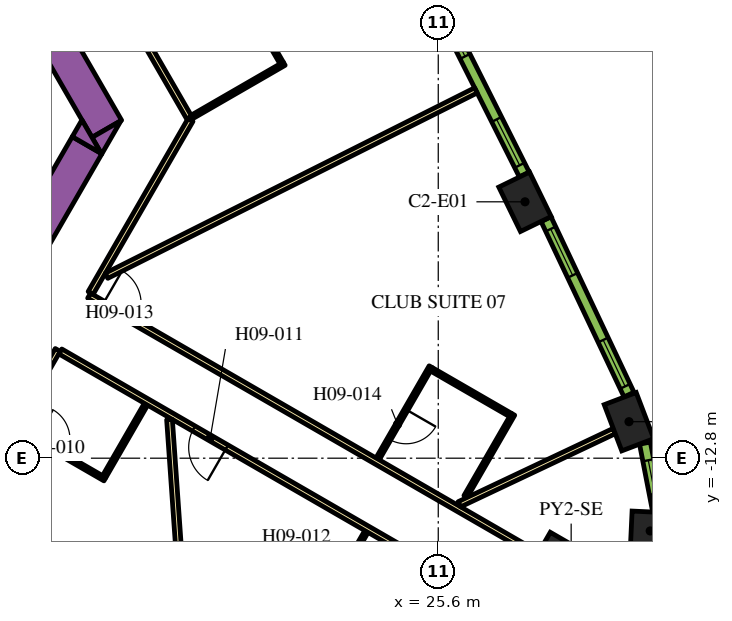
"""IFC4 building model, lengths in metres.
Left out: names, types, materials, properties, quantities, classifications, styles, units other than length and angle.
Written with IfcOpenShell. Run it as: python <this file> out.ifc"""

import sys

from ifc_helpers import new_model, si_unit, direction, frame, frame_2d, origin, origin_2d, place, context, subcontext, project, spatial, polyline, rectangle, outline, extrude, element, fill, save


model = new_model("IFC4")
c1 = context("Model", 3, precision=1e-05, world=origin(), true_north=direction((0.0, 1.0)))
c2 = subcontext(c1, "Body", "Model", "MODEL_VIEW")
j1 = project(units=[si_unit("LENGTHUNIT", "METRE"), si_unit("PLANEANGLEUNIT", "RADIAN")], contexts=[c1])
p1 = place(None, origin())
s1 = spatial("IfcSite", under=j1, at=p1, CompositionType="ELEMENT")
p2 = place(p1, origin())
s2 = spatial("IfcBuilding", under=s1, at=p2, CompositionType="ELEMENT")
p3 = place(p2, frame((0.0, 0.0, 118.8)))
s3 = spatial("IfcBuildingStorey", under=s2, at=p3, CompositionType="ELEMENT", Elevation=118.8)
p4 = place(p3, frame((29.097, -16.799, 0.0), z_axis=(0.0, 0.0, 1.0), x_axis=(0.866025403784, -0.5, 0.0)))
e1 = element("IfcColumn", 1, at=p4, inside=s3, PredefinedType="COLUMN", context=c2, shape_type="SweptSolid", body=[
    extrude(rectangle(XDim=3.0, YDim=3.0, at=origin_2d()), origin(), (0.0, 0.0, 1.0), 3.9),
])
p5 = place(p3, frame((31.177, -14.714, 0.0), z_axis=(0.0, 0.0, 1.0), x_axis=(0.046756026083, 0.998906338965, 0.0)))
e2 = element("IfcColumn", 2, at=p5, inside=s3, PredefinedType="COLUMN", context=c2, shape_type="SweptSolid", body=[
    extrude(rectangle(XDim=1.0, YDim=1.0, at=origin_2d()), origin(), (0.0, 0.0, 1.0), 3.9),
])
for number, where, z_axis, x_axis in (
    (3, (30.619, -11.839, 0.0), (0.0, 0.0, 1.0), (-0.355, 0.935, 0.0)),
    (4, (27.883, -6.054, 0.0), (0.0, 0.0, 1.0), (-0.438, 0.899, 0.0)),
):
    element("IfcColumn", number, at=place(p3, frame(where, z_axis=z_axis, x_axis=x_axis)), inside=s3, PredefinedType="COLUMN", context=c2, shape_type="SweptSolid", body=[
        extrude(rectangle(XDim=1.3, YDim=0.9, at=origin_2d()), origin(), (0.0, 0.0, 1.0), 3.9),
    ])
p6 = place(p3, frame((6.776, 13.364, 0.0), z_axis=(0.0, 0.0, 1.0), x_axis=(0.500004177138, -0.8660229921, 0.0)))
e5 = element("IfcWall", 5, at=p6, inside=s3, PredefinedType="SOLIDWALL", context=c2, shape_type="SweptSolid", body=[
    extrude(rectangle(XDim=20.204, YDim=0.9, at=frame_2d((10.102, 0.0))), origin(), (0.0, 0.0, 1.0), 3.9),
])
p7 = place(p3, origin())
e6 = element("IfcWall", 6, at=p7, inside=s3, PredefinedType="SOLIDWALL", context=c2, shape_type="SweptSolid", body=[
    extrude(outline(polyline([(16.743, -4.8), (16.489, -4.36), (17.251, -3.92), (16.743, -4.8)])), origin(), (0.0, 0.0, 1.0), 3.9),
])
p8 = place(p3, frame((11.943, -12.214, 0.0), z_axis=(0.0, 0.0, 1.0), x_axis=(0.49998092645, 0.866036415623, 0.0)))
e7 = element("IfcWall", 7, at=p8, inside=s3, PredefinedType="SOLIDWALL", context=c2, shape_type="SweptSolid", body=[
    extrude(rectangle(XDim=8.83, YDim=0.9, at=frame_2d((4.415, 0.0))), origin(), (0.0, 0.0, 1.0), 3.9),
])
e8 = element("IfcWall", 8, at=p7, inside=s3, PredefinedType="SOLIDWALL", context=c2, shape_type="SweptSolid", body=[
    extrude(outline(polyline([(16.223, -3.9), (16.732, -4.78), (15.969, -4.34), (16.223, -3.9)])), origin(), (0.0, 0.0, 1.0), 3.9),
])
p9 = place(p3, frame((16.412, -8.523, 0.0), z_axis=(0.0, 0.0, 1.0), x_axis=(0.866025629663, -0.499999608766, 0.0)))
e9 = element("IfcWall", 9, at=p9, inside=s3, PredefinedType="PARTITIONING", context=c2, shape_type="SweptSolid", body=[
    extrude(rectangle(XDim=13.624, YDim=0.15, at=frame_2d((6.812, 0.0))), origin(), (0.0, 0.0, 1.0), 2.75),
])
p10 = place(p9, frame((0.426, 0.0, 0.0)))
e10 = element("IfcOpeningElement", 10, at=p10, cuts=e9, PredefinedType="OPENING", context=c2, shape_type="SweptSolid", body=[
    extrude(rectangle(XDim=1.0, YDim=2.1, at=frame_2d((0.5, 1.05))), frame((0.0, 0.085, 0.0), z_axis=(0.0, -1.0, 0.0), x_axis=(1.0, 0.0, 0.0)), (0.0, 0.0, 1.0), 0.17),
])
p11 = place(p3, frame((19.081, -3.9, 0.0), z_axis=(0.0, 0.0, 1.0), x_axis=(-0.499974327079, -0.866040225545, 0.0)))
e11 = element("IfcWall", 11, at=p11, inside=s3, PredefinedType="PARTITIONING", context=c2, shape_type="SweptSolid", body=[
    extrude(rectangle(XDim=5.258, YDim=0.15, at=frame_2d((2.629, 0.0))), origin(), (0.0, 0.0, 1.0), 2.75),
])
p12 = place(p3, frame((6.163, 18.475, 0.0), z_axis=(0.0, 0.0, 1.0), x_axis=(0.500001317485, -0.866024643133, 0.0)))
e12 = element("IfcWall", 12, at=p12, inside=s3, PredefinedType="PARTITIONING", context=c2, shape_type="SweptSolid", body=[
    extrude(rectangle(XDim=25.767, YDim=0.15, at=frame_2d((12.883, 0.0))), origin(), (0.0, 0.0, 1.0), 2.75),
])
p13 = place(p12, frame((19.306, 0.0, 0.0)))
e13 = element("IfcOpeningElement", 13, at=p13, cuts=e12, PredefinedType="OPENING", context=c2, shape_type="SweptSolid", body=[
    extrude(rectangle(XDim=1.0, YDim=2.1, at=frame_2d((0.5, 1.05))), frame((0.0, 0.085, 0.0), z_axis=(0.0, -1.0, 0.0), x_axis=(1.0, 0.0, 0.0)), (0.0, 0.0, 1.0), 0.17),
])
p14 = place(p12, frame((17.999, 0.0, 0.0)))
e14 = element("IfcOpeningElement", 14, at=p14, cuts=e12, PredefinedType="OPENING", context=c2, shape_type="SweptSolid", body=[
    extrude(rectangle(XDim=1.0, YDim=2.1, at=frame_2d((0.5, 1.05))), frame((0.0, 0.085, 0.0), z_axis=(0.0, -1.0, 0.0), x_axis=(1.0, 0.0, 0.0)), (0.0, 0.0, 1.0), 0.17),
])
p15 = place(p12, frame((0.596, 0.0, 0.0)))
e15 = element("IfcOpeningElement", 15, at=p15, cuts=e12, PredefinedType="OPENING", context=c2, shape_type="SweptSolid", body=[
    extrude(rectangle(XDim=1.0, YDim=2.1, at=frame_2d((0.5, 1.05))), frame((0.0, 0.085, 0.0), z_axis=(0.0, -1.0, 0.0), x_axis=(1.0, 0.0, 0.0)), (0.0, 0.0, 1.0), 0.17),
])
p16 = place(p3, frame((15.587, -9.952, 0.0), z_axis=(0.0, 0.0, 1.0), x_axis=(-0.500016618951, -0.866015808616, 0.0)))
e16 = element("IfcWall", 16, at=p16, inside=s3, PredefinedType="PARTITIONING", context=c2, shape_type="SweptSolid", body=[
    extrude(rectangle(XDim=5.268, YDim=0.15, at=frame_2d((2.634, 0.0))), origin(), (0.0, 0.0, 1.0), 2.75),
])
p17 = place(p16, frame((4.088, 0.0, 0.0)))
e17 = element("IfcOpeningElement", 17, at=p17, cuts=e16, PredefinedType="OPENING", context=c2, shape_type="SweptSolid", body=[
    extrude(rectangle(XDim=1.0, YDim=2.1, at=frame_2d((0.5, 1.05))), frame((0.0, 0.085, 0.0), z_axis=(0.0, -1.0, 0.0), x_axis=(1.0, 0.0, 0.0)), (0.0, 0.0, 1.0), 0.17),
])
p18 = place(p3, frame((27.386, -16.764, 0.0), z_axis=(0.0, 0.0, 1.0), x_axis=(-0.866022585856, 0.500004880763, 0.0)))
e18 = element("IfcWall", 18, at=p18, inside=s3, PredefinedType="PARTITIONING", context=c2, shape_type="SweptSolid", body=[
    extrude(rectangle(XDim=13.544, YDim=0.15, at=frame_2d((6.772, 0.0))), origin(), (0.0, 0.0, 1.0), 2.75),
])
p19 = place(p18, frame((8.491, 0.0, 0.0)))
e19 = element("IfcOpeningElement", 19, at=p19, cuts=e18, PredefinedType="OPENING", context=c2, shape_type="SweptSolid", body=[
    extrude(rectangle(XDim=1.0, YDim=2.1, at=frame_2d((0.5, 1.05))), frame((0.0, 0.085, 0.0), z_axis=(0.0, -1.0, 0.0), x_axis=(1.0, 0.0, 0.0)), (0.0, 0.0, 1.0), 0.17),
])
p20 = place(p3, frame((26.591, -3.122, 0.0), z_axis=(0.0, 0.0, 1.0), x_axis=(-0.893766213273, -0.448533115847, 0.0)))
e20 = element("IfcWall", 20, at=p20, inside=s3, PredefinedType="PARTITIONING", context=c2, shape_type="SweptSolid", body=[
    extrude(rectangle(XDim=10.875, YDim=0.15, at=frame_2d((5.438, 0.0))), origin(), (0.0, 0.0, 1.0), 2.75),
])
p21 = place(p3, frame((19.153, -20.671, 0.0), z_axis=(0.0, 0.0, 1.0), x_axis=(-0.070070736723, 0.997542025107, 0.0)))
e21 = element("IfcWall", 21, at=p21, inside=s3, PredefinedType="PARTITIONING", context=c2, shape_type="SweptSolid", body=[
    extrude(rectangle(XDim=8.909, YDim=0.15, at=frame_2d((4.455, 0.0))), origin(), (0.0, 0.0, 1.0), 2.75),
])
p22 = place(p3, frame((30.231, -12.085, 0.0), z_axis=(0.0, 0.0, 1.0), x_axis=(-0.904001132572, -0.427530060122, 0.0)))
e22 = element("IfcWall", 22, at=p22, inside=s3, PredefinedType="PARTITIONING", context=c2, shape_type="SweptSolid", body=[
    extrude(rectangle(XDim=4.51, YDim=0.15, at=frame_2d((2.255, 0.0))), origin(), (0.0, 0.0, 1.0), 2.75),
])
p23 = place(p3, frame((14.49, -12.003, 0.0), z_axis=(0.0, 0.0, 1.0), x_axis=(0.866059108428, -0.4999416173, 0.0)))
e23 = element("IfcWall", 23, at=p23, inside=s3, PredefinedType="PARTITIONING", context=c2, shape_type="SweptSolid", body=[
    extrude(rectangle(XDim=2.7, YDim=0.1, at=frame_2d((1.35, 0.0))), origin(), (0.0, 0.0, 1.0), 2.75),
])
p24 = place(p23, frame((0.6, 0.0, 0.0)))
e24 = element("IfcOpeningElement", 24, at=p24, cuts=e23, PredefinedType="OPENING", context=c2, shape_type="SweptSolid", body=[
    extrude(rectangle(XDim=0.9, YDim=2.1, at=frame_2d((0.45, 1.05))), frame((0.0, 0.06, 0.0), z_axis=(0.0, -1.0, 0.0), x_axis=(1.0, 0.0, 0.0)), (0.0, 0.0, 1.0), 0.12),
])
p25 = place(p3, frame((16.81, -13.285, 0.0), z_axis=(0.0, 0.0, 1.0), x_axis=(0.499994660107, 0.866028486751, 0.0)))
e25 = element("IfcWall", 25, at=p25, inside=s3, PredefinedType="PARTITIONING", context=c2, shape_type="SweptSolid", body=[
    extrude(rectangle(XDim=2.2, YDim=0.1, at=frame_2d((1.1, 0.0))), origin(), (0.0, 0.0, 1.0), 2.75),
])
p26 = place(p3, frame((23.71, -14.728, 0.0), z_axis=(0.0, 0.0, 1.0), x_axis=(-0.500006934395, -0.866021400173, 0.0)))
e26 = element("IfcWall", 26, at=p26, inside=s3, PredefinedType="PARTITIONING", context=c2, shape_type="SweptSolid", body=[
    extrude(rectangle(XDim=2.6, YDim=0.1, at=frame_2d((1.3, 0.0))), origin(), (0.0, 0.0, 1.0), 2.75),
])
p27 = place(p26, frame((0.6, 0.0, 0.0)))
e27 = element("IfcOpeningElement", 27, at=p27, cuts=e26, PredefinedType="OPENING", context=c2, shape_type="SweptSolid", body=[
    extrude(rectangle(XDim=0.9, YDim=2.1, at=frame_2d((0.45, 1.05))), frame((0.0, 0.06, 0.0), z_axis=(0.0, -1.0, 0.0), x_axis=(1.0, 0.0, 0.0)), (0.0, 0.0, 1.0), 0.12),
])
p28 = place(p3, frame((25.404, -10.395, 0.0), z_axis=(0.0, 0.0, 1.0), x_axis=(-0.49998411664, -0.866034573852, 0.0)))
e28 = element("IfcWall", 28, at=p28, inside=s3, PredefinedType="PARTITIONING", context=c2, shape_type="SweptSolid", body=[
    extrude(rectangle(XDim=2.8, YDim=0.1, at=frame_2d((1.4, 0.0))), origin(), (0.0, 0.0, 1.0), 2.75),
])
p29 = place(p28, frame((1.3, 0.0, 0.0)))
e29 = element("IfcOpeningElement", 29, at=p29, cuts=e28, PredefinedType="OPENING", context=c2, shape_type="SweptSolid", body=[
    extrude(rectangle(XDim=0.9, YDim=2.1, at=frame_2d((0.45, 1.05))), frame((0.0, 0.06, 0.0), z_axis=(0.0, -1.0, 0.0), x_axis=(1.0, 0.0, 0.0)), (0.0, 0.0, 1.0), 0.12),
])
p30 = place(p3, frame((25.422, -10.463, 0.0), z_axis=(0.0, 0.0, 1.0), x_axis=(0.866024647952, -0.500001309137, 0.0)))
e30 = element("IfcWall", 30, at=p30, inside=s3, PredefinedType="PARTITIONING", context=c2, shape_type="SweptSolid", body=[
    extrude(rectangle(XDim=2.4, YDim=0.1, at=frame_2d((1.2, 0.0))), origin(), (0.0, 0.0, 1.0), 2.75),
])
p31 = place(p3, frame((26.319, -13.81, 0.0), z_axis=(0.0, 0.0, 1.0), x_axis=(0.500004234368, 0.866022959057, 0.0)))
e31 = element("IfcWall", 31, at=p31, inside=s3, PredefinedType="PARTITIONING", context=c2, shape_type="SweptSolid", body=[
    extrude(rectangle(XDim=2.5, YDim=0.1, at=frame_2d((1.25, 0.0))), origin(), (0.0, 0.0, 1.0), 2.75),
])
p32 = place(p3, frame((20.278, -0.323, 0.0), z_axis=(0.0, 0.0, 1.0), x_axis=(0.500001309137, -0.866024647952, 0.0)))
e32 = element("IfcWall", 32, at=p32, inside=s3, PredefinedType="PARTITIONING", context=c2, shape_type="SweptSolid", body=[
    extrude(rectangle(XDim=2.4, YDim=0.1, at=frame_2d((1.2, 0.0))), origin(), (0.0, 0.0, 1.0), 2.75),
])
p33 = place(p3, frame((19.121, -3.819, 0.0), z_axis=(0.0, 0.0, 1.0), x_axis=(0.866034573852, 0.49998411664, 0.0)))
e33 = element("IfcWall", 33, at=p33, inside=s3, PredefinedType="PARTITIONING", context=c2, shape_type="SweptSolid", body=[
    extrude(rectangle(XDim=2.8, YDim=0.1, at=frame_2d((1.4, 0.0))), origin(), (0.0, 0.0, 1.0), 2.75),
])
p34 = place(p3, frame((31.385, -14.189, 0.0), z_axis=(0.0, 0.0, 1.0), x_axis=(-0.190409913989, 0.981704672829, 0.0)))
e34 = element("IfcWall", 34, at=p34, inside=s3, PredefinedType="SOLIDWALL", context=c2, shape_type="SweptSolid", body=[
    extrude(rectangle(XDim=1.819, YDim=0.29, at=frame_2d((0.91, 0.0))), origin(), (0.0, 0.0, 1.0), 3.65),
])
p35 = place(p34, frame((0.46, 0.0, 0.9)))
e35 = element("IfcOpeningElement", 35, at=p35, cuts=e34, PredefinedType="OPENING", context=c2, shape_type="SweptSolid", body=[
    extrude(rectangle(XDim=0.9, YDim=2.15, at=frame_2d((0.45, 1.075))), frame((0.0, 0.155, 0.0), z_axis=(0.0, -1.0, 0.0), x_axis=(1.0, 0.0, 0.0)), (0.0, 0.0, 1.0), 0.31),
])
p36 = place(p3, frame((30.62, -11.127, 0.0), z_axis=(0.0, 0.0, 1.0), x_axis=(-0.427543726596, 0.903994669148, 0.0)))
e36 = element("IfcWall", 36, at=p36, inside=s3, PredefinedType="SOLIDWALL", context=c2, shape_type="SweptSolid", body=[
    extrude(rectangle(XDim=5.107, YDim=0.29, at=frame_2d((2.553, 0.0))), origin(), (0.0, 0.0, 1.0), 3.65),
])
p37 = place(p36, frame((0.24, 0.0, 0.9)))
e37 = element("IfcOpeningElement", 37, at=p37, cuts=e36, PredefinedType="OPENING", context=c2, shape_type="SweptSolid", body=[
    extrude(rectangle(XDim=1.35, YDim=2.15, at=frame_2d((0.675, 1.075))), frame((0.0, 0.155, 0.0), z_axis=(0.0, -1.0, 0.0), x_axis=(1.0, 0.0, 0.0)), (0.0, 0.0, 1.0), 0.31),
])
p38 = place(p36, frame((3.471, 0.0, 0.9)))
e38 = element("IfcOpeningElement", 38, at=p38, cuts=e36, PredefinedType="OPENING", context=c2, shape_type="SweptSolid", body=[
    extrude(rectangle(XDim=1.35, YDim=2.15, at=frame_2d((0.675, 1.075))), frame((0.0, 0.155, 0.0), z_axis=(0.0, -1.0, 0.0), x_axis=(1.0, 0.0, 0.0)), (0.0, 0.0, 1.0), 0.31),
])
p39 = place(p3, frame((27.864, -5.336, 0.0), z_axis=(0.0, 0.0, 1.0), x_axis=(-0.448534297211, 0.893765620409, 0.0)))
e39 = element("IfcWall", 39, at=p39, inside=s3, PredefinedType="SOLIDWALL", context=c2, shape_type="SweptSolid", body=[
    extrude(rectangle(XDim=5.1, YDim=0.29, at=frame_2d((2.55, 0.0))), origin(), (0.0, 0.0, 1.0), 3.65),
])
p40 = place(p39, frame((0.272, 0.0, 0.9)))
e40 = element("IfcOpeningElement", 40, at=p40, cuts=e39, PredefinedType="OPENING", context=c2, shape_type="SweptSolid", body=[
    extrude(rectangle(XDim=1.35, YDim=2.15, at=frame_2d((0.675, 1.075))), frame((0.0, 0.155, 0.0), z_axis=(0.0, -1.0, 0.0), x_axis=(1.0, 0.0, 0.0)), (0.0, 0.0, 1.0), 0.31),
])
p41 = place(p39, frame((3.478, 0.0, 0.9)))
e41 = element("IfcOpeningElement", 41, at=p41, cuts=e39, PredefinedType="OPENING", context=c2, shape_type="SweptSolid", body=[
    extrude(rectangle(XDim=1.35, YDim=2.15, at=frame_2d((0.675, 1.075))), frame((0.0, 0.155, 0.0), z_axis=(0.0, -1.0, 0.0), x_axis=(1.0, 0.0, 0.0)), (0.0, 0.0, 1.0), 0.31),
])
p42 = place(p24, origin())
e42 = element("IfcDoor", 42, at=p42, inside=s3, OperationType="SINGLE_SWING_LEFT", PredefinedType="DOOR", context=c2, shape_type="SweptSolid", body=[
    extrude(rectangle(XDim=0.9, YDim=2.1, at=frame_2d((0.45, 1.05))), frame((0.0, 0.025, 0.0), z_axis=(0.0, -1.0, 0.0), x_axis=(1.0, 0.0, 0.0)), (0.0, 0.0, 1.0), 0.05),
])
fill(e24, e42)
p43 = place(p19, origin())
e43 = element("IfcDoor", 43, at=p43, inside=s3, OperationType="SINGLE_SWING_RIGHT", PredefinedType="DOOR", context=c2, shape_type="SweptSolid", body=[
    extrude(rectangle(XDim=1.0, YDim=2.1, at=frame_2d((0.5, 1.05))), frame((0.0, 0.025, 0.0), z_axis=(0.0, -1.0, 0.0), x_axis=(1.0, 0.0, 0.0)), (0.0, 0.0, 1.0), 0.05),
])
fill(e19, e43)
p44 = place(p10, origin())
e44 = element("IfcDoor", 44, at=p44, inside=s3, OperationType="SINGLE_SWING_LEFT", PredefinedType="DOOR", context=c2, shape_type="SweptSolid", body=[
    extrude(rectangle(XDim=1.0, YDim=2.1, at=frame_2d((0.5, 1.05))), frame((0.0, 0.025, 0.0), z_axis=(0.0, -1.0, 0.0), x_axis=(1.0, 0.0, 0.0)), (0.0, 0.0, 1.0), 0.05),
])
fill(e10, e44)
p45 = place(p29, origin())
e45 = element("IfcDoor", 45, at=p45, inside=s3, OperationType="SINGLE_SWING_LEFT", PredefinedType="DOOR", context=c2, shape_type="SweptSolid", body=[
    extrude(rectangle(XDim=0.9, YDim=2.1, at=frame_2d((0.45, 1.05))), frame((0.0, 0.025, 0.0), z_axis=(0.0, -1.0, 0.0), x_axis=(1.0, 0.0, 0.0)), (0.0, 0.0, 1.0), 0.05),
])
fill(e29, e45)
p46 = place(p35, origin())
e46 = element("IfcWindow", 46, at=p46, inside=s3, PartitioningType="SINGLE_PANEL", PredefinedType="WINDOW", context=c2, shape_type="SweptSolid", body=[
    extrude(rectangle(XDim=0.9, YDim=2.15, at=frame_2d((0.45, 1.075))), frame((0.0, 0.015, 0.0), z_axis=(0.0, -1.0, 0.0), x_axis=(1.0, 0.0, 0.0)), (0.0, 0.0, 1.0), 0.06),
])
fill(e35, e46)
p47 = place(p37, origin())
e47 = element("IfcWindow", 47, at=p47, inside=s3, PartitioningType="DOUBLE_PANEL_VERTICAL", PredefinedType="WINDOW", context=c2, shape_type="SweptSolid", body=[
    extrude(rectangle(XDim=1.35, YDim=2.15, at=frame_2d((0.675, 1.075))), frame((0.0, 0.015, 0.0), z_axis=(0.0, -1.0, 0.0), x_axis=(1.0, 0.0, 0.0)), (0.0, 0.0, 1.0), 0.06),
])
fill(e37, e47)
p48 = place(p38, origin())
e48 = element("IfcWindow", 48, at=p48, inside=s3, PartitioningType="DOUBLE_PANEL_VERTICAL", PredefinedType="WINDOW", context=c2, shape_type="SweptSolid", body=[
    extrude(rectangle(XDim=1.35, YDim=2.15, at=frame_2d((0.675, 1.075))), frame((0.0, 0.015, 0.0), z_axis=(0.0, -1.0, 0.0), x_axis=(1.0, 0.0, 0.0)), (0.0, 0.0, 1.0), 0.06),
])
fill(e38, e48)
p49 = place(p40, origin())
e49 = element("IfcWindow", 49, at=p49, inside=s3, PartitioningType="DOUBLE_PANEL_VERTICAL", PredefinedType="WINDOW", context=c2, shape_type="SweptSolid", body=[
    extrude(rectangle(XDim=1.35, YDim=2.15, at=frame_2d((0.675, 1.075))), frame((0.0, 0.015, 0.0), z_axis=(0.0, -1.0, 0.0), x_axis=(1.0, 0.0, 0.0)), (0.0, 0.0, 1.0), 0.06),
])
fill(e40, e49)
p50 = place(p41, origin())
e50 = element("IfcWindow", 50, at=p50, inside=s3, PartitioningType="DOUBLE_PANEL_VERTICAL", PredefinedType="WINDOW", context=c2, shape_type="SweptSolid", body=[
    extrude(rectangle(XDim=1.35, YDim=2.15, at=frame_2d((0.675, 1.075))), frame((0.0, 0.015, 0.0), z_axis=(0.0, -1.0, 0.0), x_axis=(1.0, 0.0, 0.0)), (0.0, 0.0, 1.0), 0.06),
])
fill(e41, e50)
save(model, sys.argv[1])
